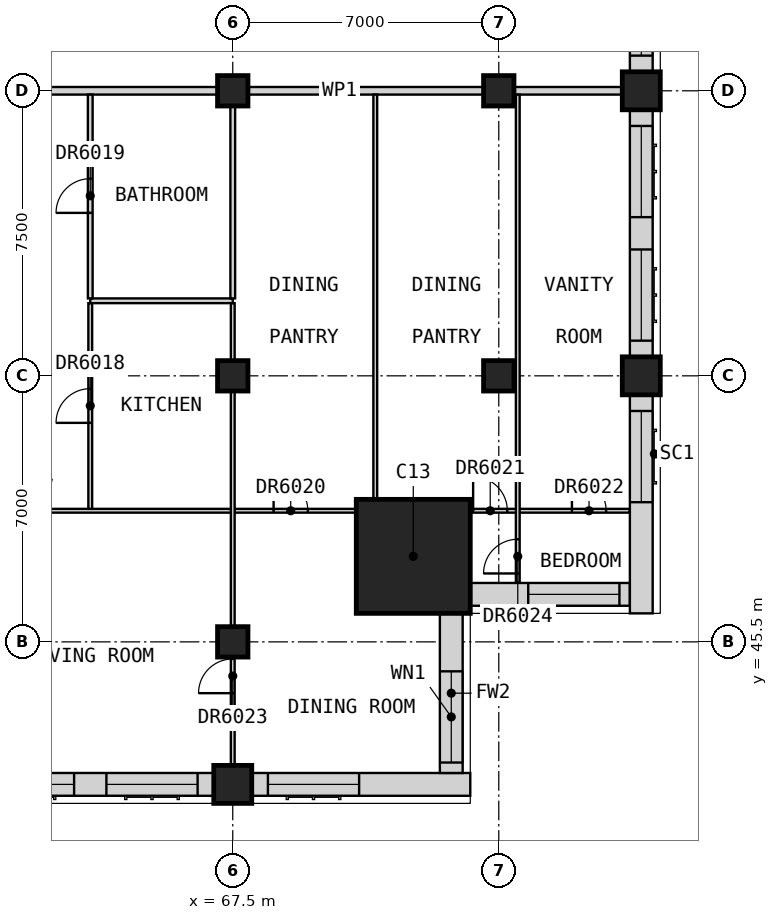
"""IFC4 building model, lengths in metres.
Left out: names, types, materials, properties, quantities, classifications, styles, units other than length and angle.
Written with IfcOpenShell. Run it as: python <this file> out.ifc"""

import sys

from ifc_helpers import new_model, si_unit, direction, frame, frame_2d, origin, origin_2d, place, context, subcontext, project, spatial, rectangle, extrude, element, fill, save


model = new_model("IFC4")
c1 = context("Model", 3, precision=1e-05, world=origin(), true_north=direction((0.0, 1.0)))
c2 = subcontext(c1, "Body", "Model", "MODEL_VIEW")
j1 = project(units=[si_unit("LENGTHUNIT", "METRE"), si_unit("PLANEANGLEUNIT", "RADIAN")], contexts=[c1])
p1 = place(None, origin())
s1 = spatial("IfcSite", under=j1, at=p1, CompositionType="ELEMENT")
p2 = place(p1, origin())
s2 = spatial("IfcBuilding", under=s1, at=p2, CompositionType="ELEMENT")
p3 = place(p2, frame((0.0, 0.0, 226.7)))
s3 = spatial("IfcBuildingStorey", under=s2, at=p3, CompositionType="ELEMENT", Elevation=226.7)
for number, where, z_axis, x_axis in (
    (1, (67.5, 41.75, 0.0), (0.0, 0.0, 1.0), (1.0, 0.0, 0.0)),
    (2, (78.25, 52.5, 0.0), (0.0, 0.0, 1.0), (1.0, 0.0, 0.0)),
    (3, (78.25, 60.0, 0.0), (0.0, 0.0, 1.0), (1.0, 0.0, 0.0)),
):
    element("IfcColumn", number, at=place(p3, frame(where, z_axis=z_axis, x_axis=x_axis)), inside=s3, PredefinedType="COLUMN", context=c2, shape_type="SweptSolid", body=[
        extrude(rectangle(XDim=1.0, YDim=1.0, at=origin_2d()), origin(), (0.0, 0.0, 1.0), 3.5),
    ])
for number, where, z_axis, x_axis in (
    (4, (67.5, 45.5, 0.0), (0.0, 0.0, 1.0), (1.0, 0.0, 0.0)),
    (5, (67.5, 52.5, 0.0), (0.0, 0.0, 1.0), (1.0, 0.0, 0.0)),
    (6, (67.5, 60.0, 0.0), (0.0, 0.0, 1.0), (1.0, 0.0, 0.0)),
    (7, (74.5, 52.5, 0.0), (0.0, 0.0, 1.0), (1.0, 0.0, 0.0)),
    (8, (74.5, 60.0, 0.0), (0.0, 0.0, 1.0), (1.0, 0.0, 0.0)),
):
    element("IfcColumn", number, at=place(p3, frame(where, z_axis=z_axis, x_axis=x_axis)), inside=s3, PredefinedType="COLUMN", context=c2, shape_type="SweptSolid", body=[
        extrude(rectangle(XDim=0.8, YDim=0.8, at=origin_2d()), origin(), (0.0, 0.0, 1.0), 3.5),
    ])
p4 = place(p3, frame((72.25, 47.75, 0.0), z_axis=(0.0, 0.0, 1.0), x_axis=(1.0, 0.0, 0.0)))
e9 = element("IfcColumn", 9, at=p4, inside=s3, PredefinedType="COLUMN", context=c2, shape_type="SweptSolid", body=[
    extrude(rectangle(XDim=3.0, YDim=3.0, at=origin_2d()), origin(), (0.0, 0.0, 1.0), 3.5),
])
p5 = place(p3, frame((60.5, 41.75, 0.0), z_axis=(0.0, 0.0, 1.0), x_axis=(1.0, 0.0, 0.0)))
e10 = element("IfcWall", 10, at=p5, inside=s3, PredefinedType="SOLIDWALL", context=c2, shape_type="SweptSolid", body=[
    extrude(rectangle(XDim=6.5, YDim=0.6, at=frame_2d((3.25, 0.0))), origin(), (0.0, 0.0, 1.0), 2.75),
])
p6 = place(p5, frame((0.425, 0.0, 0.8)))
e11 = element("IfcOpeningElement", 11, at=p6, cuts=e10, PredefinedType="OPENING", context=c2, shape_type="SweptSolid", body=[
    extrude(rectangle(XDim=2.4, YDim=1.8, at=frame_2d((1.2, 0.9))), frame((0.0, 0.31, 0.0), z_axis=(0.0, -1.0, 0.0), x_axis=(1.0, 0.0, 0.0)), (0.0, 0.0, 1.0), 0.62),
])
p7 = place(p5, frame((3.675, 0.0, 0.8)))
e12 = element("IfcOpeningElement", 12, at=p7, cuts=e10, PredefinedType="OPENING", context=c2, shape_type="SweptSolid", body=[
    extrude(rectangle(XDim=2.4, YDim=1.8, at=frame_2d((1.2, 0.9))), frame((0.0, 0.31, 0.0), z_axis=(0.0, -1.0, 0.0), x_axis=(1.0, 0.0, 0.0)), (0.0, 0.0, 1.0), 0.62),
])
p8 = place(p3, frame((68.0, 41.75, 0.0), z_axis=(0.0, 0.0, 1.0), x_axis=(1.0, 0.0, 0.0)))
e13 = element("IfcWall", 13, at=p8, inside=s3, PredefinedType="SOLIDWALL", context=c2, shape_type="SweptSolid", body=[
    extrude(rectangle(XDim=5.75, YDim=0.6, at=frame_2d((2.875, 0.0))), origin(), (0.0, 0.0, 1.0), 2.75),
])
p9 = place(p8, frame((0.425, 0.0, 0.8)))
e14 = element("IfcOpeningElement", 14, at=p9, cuts=e13, PredefinedType="OPENING", context=c2, shape_type="SweptSolid", body=[
    extrude(rectangle(XDim=2.4, YDim=1.8, at=frame_2d((1.2, 0.9))), frame((0.0, 0.31, 0.0), z_axis=(0.0, -1.0, 0.0), x_axis=(1.0, 0.0, 0.0)), (0.0, 0.0, 1.0), 0.62),
])
p10 = place(p3, frame((73.25, 42.05, 0.0), z_axis=(0.0, 0.0, 1.0), x_axis=(0.0, 1.0, 0.0)))
e15 = element("IfcWall", 15, at=p10, inside=s3, PredefinedType="SOLIDWALL", context=c2, shape_type="SweptSolid", body=[
    extrude(rectangle(XDim=4.2, YDim=0.6, at=frame_2d((2.1, 0.0))), origin(), (0.0, 0.0, 1.0), 3.25),
])
p11 = place(p10, frame((0.275, 0.0, 0.8)))
e16 = element("IfcOpeningElement", 16, at=p11, cuts=e15, PredefinedType="OPENING", context=c2, shape_type="SweptSolid", body=[
    extrude(rectangle(XDim=2.4, YDim=1.8, at=frame_2d((1.2, 0.9))), frame((0.0, 0.31, 0.0), z_axis=(0.0, -1.0, 0.0), x_axis=(1.0, 0.0, 0.0)), (0.0, 0.0, 1.0), 0.62),
])
p12 = place(p3, frame((73.75, 46.75, 0.0), z_axis=(0.0, 0.0, 1.0), x_axis=(1.0, 0.0, 0.0)))
e17 = element("IfcWall", 17, at=p12, inside=s3, PredefinedType="SOLIDWALL", context=c2, shape_type="SweptSolid", body=[
    extrude(rectangle(XDim=4.2, YDim=0.6, at=frame_2d((2.1, 0.0))), origin(), (0.0, 0.0, 1.0), 3.25),
])
p13 = place(p12, frame((1.525, 0.0, 0.8)))
e18 = element("IfcOpeningElement", 18, at=p13, cuts=e17, PredefinedType="OPENING", context=c2, shape_type="SweptSolid", body=[
    extrude(rectangle(XDim=2.4, YDim=1.8, at=frame_2d((1.2, 0.9))), frame((0.0, 0.31, 0.0), z_axis=(0.0, -1.0, 0.0), x_axis=(1.0, 0.0, 0.0)), (0.0, 0.0, 1.0), 0.62),
])
p14 = place(p3, frame((78.25, 46.25, 0.0), z_axis=(0.0, 0.0, 1.0), x_axis=(0.0, 1.0, 0.0)))
e19 = element("IfcWall", 19, at=p14, inside=s3, PredefinedType="SOLIDWALL", context=c2, shape_type="SweptSolid", body=[
    extrude(rectangle(XDim=5.75, YDim=0.6, at=frame_2d((2.875, 0.0))), origin(), (0.0, 0.0, 1.0), 2.75),
])
p15 = place(p14, frame((2.925, 0.0, 0.8)))
e20 = element("IfcOpeningElement", 20, at=p15, cuts=e19, PredefinedType="OPENING", context=c2, shape_type="SweptSolid", body=[
    extrude(rectangle(XDim=2.4, YDim=1.8, at=frame_2d((1.2, 0.9))), frame((0.0, 0.31, 0.0), z_axis=(0.0, -1.0, 0.0), x_axis=(1.0, 0.0, 0.0)), (0.0, 0.0, 1.0), 0.62),
])
p16 = place(p3, frame((78.25, 53.0, 0.0), z_axis=(0.0, 0.0, 1.0), x_axis=(0.0, 1.0, 0.0)))
e21 = element("IfcWall", 21, at=p16, inside=s3, PredefinedType="SOLIDWALL", context=c2, shape_type="SweptSolid", body=[
    extrude(rectangle(XDim=6.5, YDim=0.6, at=frame_2d((3.25, 0.0))), origin(), (0.0, 0.0, 1.0), 2.75),
])
p17 = place(p16, frame((0.425, 0.0, 0.8)))
e22 = element("IfcOpeningElement", 22, at=p17, cuts=e21, PredefinedType="OPENING", context=c2, shape_type="SweptSolid", body=[
    extrude(rectangle(XDim=2.4, YDim=1.8, at=frame_2d((1.2, 0.9))), frame((0.0, 0.31, 0.0), z_axis=(0.0, -1.0, 0.0), x_axis=(1.0, 0.0, 0.0)), (0.0, 0.0, 1.0), 0.62),
])
p18 = place(p16, frame((3.675, 0.0, 0.8)))
e23 = element("IfcOpeningElement", 23, at=p18, cuts=e21, PredefinedType="OPENING", context=c2, shape_type="SweptSolid", body=[
    extrude(rectangle(XDim=2.4, YDim=1.8, at=frame_2d((1.2, 0.9))), frame((0.0, 0.31, 0.0), z_axis=(0.0, -1.0, 0.0), x_axis=(1.0, 0.0, 0.0)), (0.0, 0.0, 1.0), 0.62),
])
p19 = place(p3, frame((78.25, 60.5, 0.0), z_axis=(0.0, 0.0, 1.0), x_axis=(0.0, 1.0, 0.0)))
e24 = element("IfcWall", 24, at=p19, inside=s3, PredefinedType="SOLIDWALL", context=c2, shape_type="SweptSolid", body=[
    extrude(rectangle(XDim=6.5, YDim=0.6, at=frame_2d((3.25, 0.0))), origin(), (0.0, 0.0, 1.0), 2.75),
])
p20 = place(p19, frame((0.425, 0.0, 0.8)))
e25 = element("IfcOpeningElement", 25, at=p20, cuts=e24, PredefinedType="OPENING", context=c2, shape_type="SweptSolid", body=[
    extrude(rectangle(XDim=2.4, YDim=1.8, at=frame_2d((1.2, 0.9))), frame((0.0, 0.31, 0.0), z_axis=(0.0, -1.0, 0.0), x_axis=(1.0, 0.0, 0.0)), (0.0, 0.0, 1.0), 0.62),
])
p21 = place(p19, frame((3.675, 0.0, 0.8)))
e26 = element("IfcOpeningElement", 26, at=p21, cuts=e24, PredefinedType="OPENING", context=c2, shape_type="SweptSolid", body=[
    extrude(rectangle(XDim=2.4, YDim=1.8, at=frame_2d((1.2, 0.9))), frame((0.0, 0.31, 0.0), z_axis=(0.0, -1.0, 0.0), x_axis=(1.0, 0.0, 0.0)), (0.0, 0.0, 1.0), 0.62),
])
p22 = place(p3, frame((61.875, 60.0, 0.0), z_axis=(0.0, 0.0, 1.0), x_axis=(1.0, 0.0, 0.0)))
e27 = element("IfcWall", 27, at=p22, inside=s3, PredefinedType="PARTITIONING", context=c2, shape_type="SweptSolid", body=[
    extrude(rectangle(XDim=16.875, YDim=0.2, at=frame_2d((8.438, 0.0))), origin(), (0.0, 0.0, 1.0), 3.25),
])
p23 = place(p3, frame((60.1, 48.95, 0.0), z_axis=(0.0, 0.0, 1.0), x_axis=(1.0, 0.0, 0.0)))
e28 = element("IfcWall", 28, at=p23, inside=s3, PredefinedType="PARTITIONING", context=c2, shape_type="SweptSolid", body=[
    extrude(rectangle(XDim=17.84, YDim=0.1, at=frame_2d((8.92, 0.0))), origin(), (0.0, 0.0, 1.0), 3.25),
])
p24 = place(p23, frame((1.325, 0.0, 0.0)))
e29 = element("IfcOpeningElement", 29, at=p24, cuts=e28, PredefinedType="OPENING", context=c2, shape_type="SweptSolid", body=[
    extrude(rectangle(XDim=0.9, YDim=2.1, at=frame_2d((0.45, 1.05))), frame((0.0, 0.06, 0.0), z_axis=(0.0, -1.0, 0.0), x_axis=(1.0, 0.0, 0.0)), (0.0, 0.0, 1.0), 0.12),
])
p25 = place(p23, frame((8.475, 0.0, 0.0)))
e30 = element("IfcOpeningElement", 30, at=p25, cuts=e28, PredefinedType="OPENING", context=c2, shape_type="SweptSolid", body=[
    extrude(rectangle(XDim=0.9, YDim=2.1, at=frame_2d((0.45, 1.05))), frame((0.0, 0.06, 0.0), z_axis=(0.0, -1.0, 0.0), x_axis=(1.0, 0.0, 0.0)), (0.0, 0.0, 1.0), 0.12),
])
p26 = place(p23, frame((13.725, 0.0, 0.0)))
e31 = element("IfcOpeningElement", 31, at=p26, cuts=e28, PredefinedType="OPENING", context=c2, shape_type="SweptSolid", body=[
    extrude(rectangle(XDim=0.9, YDim=2.1, at=frame_2d((0.45, 1.05))), frame((0.0, 0.06, 0.0), z_axis=(0.0, -1.0, 0.0), x_axis=(1.0, 0.0, 0.0)), (0.0, 0.0, 1.0), 0.12),
])
p27 = place(p23, frame((16.325, 0.0, 0.0)))
e32 = element("IfcOpeningElement", 32, at=p27, cuts=e28, PredefinedType="OPENING", context=c2, shape_type="SweptSolid", body=[
    extrude(rectangle(XDim=0.9, YDim=2.1, at=frame_2d((0.45, 1.05))), frame((0.0, 0.06, 0.0), z_axis=(0.0, -1.0, 0.0), x_axis=(1.0, 0.0, 0.0)), (0.0, 0.0, 1.0), 0.12),
])
p28 = place(p3, frame((63.75, 49.0, 0.0), z_axis=(0.0, 0.0, 1.0), x_axis=(0.0, 1.0, 0.0)))
e33 = element("IfcWall", 33, at=p28, inside=s3, PredefinedType="PARTITIONING", context=c2, shape_type="SweptSolid", body=[
    extrude(rectangle(XDim=5.413, YDim=0.1, at=frame_2d((2.706, 0.0))), origin(), (0.0, 0.0, 1.0), 3.25),
])
p29 = place(p28, frame((2.262, 0.0, 0.0)))
e34 = element("IfcOpeningElement", 34, at=p29, cuts=e33, PredefinedType="OPENING", context=c2, shape_type="SweptSolid", body=[
    extrude(rectangle(XDim=0.9, YDim=2.1, at=frame_2d((0.45, 1.05))), frame((0.0, 0.06, 0.0), z_axis=(0.0, -1.0, 0.0), x_axis=(1.0, 0.0, 0.0)), (0.0, 0.0, 1.0), 0.12),
])
p30 = place(p3, frame((67.5, 41.25, 0.0), z_axis=(0.0, 0.0, 1.0), x_axis=(0.0, 1.0, 0.0)))
e35 = element("IfcWall", 35, at=p30, inside=s3, PredefinedType="PARTITIONING", context=c2, shape_type="SweptSolid", body=[
    extrude(rectangle(XDim=13.163, YDim=0.1, at=frame_2d((6.581, 0.0))), origin(), (0.0, 0.0, 1.0), 3.25),
])
p31 = place(p30, frame((2.9, 0.0, 0.0)))
e36 = element("IfcOpeningElement", 36, at=p31, cuts=e35, PredefinedType="OPENING", context=c2, shape_type="SweptSolid", body=[
    extrude(rectangle(XDim=0.9, YDim=2.1, at=frame_2d((0.45, 1.05))), frame((0.0, 0.06, 0.0), z_axis=(0.0, -1.0, 0.0), x_axis=(1.0, 0.0, 0.0)), (0.0, 0.0, 1.0), 0.12),
])
p32 = place(p3, frame((71.25, 49.0, 0.0), z_axis=(0.0, 0.0, 1.0), x_axis=(0.0, 1.0, 0.0)))
e37 = element("IfcWall", 37, at=p32, inside=s3, PredefinedType="PARTITIONING", context=c2, shape_type="SweptSolid", body=[
    extrude(rectangle(XDim=10.9, YDim=0.1, at=frame_2d((5.45, 0.0))), origin(), (0.0, 0.0, 1.0), 3.25),
])
p33 = place(p3, frame((75.0, 47.06, 0.0), z_axis=(0.0, 0.0, 1.0), x_axis=(0.0, 1.0, 0.0)))
e38 = element("IfcWall", 38, at=p33, inside=s3, PredefinedType="PARTITIONING", context=c2, shape_type="SweptSolid", body=[
    extrude(rectangle(XDim=12.84, YDim=0.1, at=frame_2d((6.42, 0.0))), origin(), (0.0, 0.0, 1.0), 3.25),
])
p34 = place(p33, frame((0.24, 0.0, 0.0)))
e39 = element("IfcOpeningElement", 39, at=p34, cuts=e38, PredefinedType="OPENING", context=c2, shape_type="SweptSolid", body=[
    extrude(rectangle(XDim=0.9, YDim=2.1, at=frame_2d((0.45, 1.05))), frame((0.0, 0.06, 0.0), z_axis=(0.0, -1.0, 0.0), x_axis=(1.0, 0.0, 0.0)), (0.0, 0.0, 1.0), 0.12),
])
p35 = place(p3, frame((63.75, 54.475, 0.0), z_axis=(0.0, 0.0, 1.0), x_axis=(1.0, 0.0, 0.0)))
e40 = element("IfcWall", 40, at=p35, inside=s3, PredefinedType="PARTITIONING", context=c2, shape_type="SweptSolid", body=[
    extrude(rectangle(XDim=3.75, YDim=0.125, at=frame_2d((1.875, 0.0))), origin(), (0.0, 0.0, 1.0), 3.25),
])
p36 = place(p3, frame((63.75, 54.538, 0.0), z_axis=(0.0, 0.0, 1.0), x_axis=(0.0, 1.0, 0.0)))
e41 = element("IfcWall", 41, at=p36, inside=s3, PredefinedType="PARTITIONING", context=c2, shape_type="SweptSolid", body=[
    extrude(rectangle(XDim=5.362, YDim=0.125, at=frame_2d((2.681, 0.0))), origin(), (0.0, 0.0, 1.0), 3.25),
])
p37 = place(p36, frame((2.25, 0.0, 0.0)))
e42 = element("IfcOpeningElement", 42, at=p37, cuts=e41, PredefinedType="OPENING", context=c2, shape_type="SweptSolid", body=[
    extrude(rectangle(XDim=0.9, YDim=2.1, at=frame_2d((0.45, 1.05))), frame((0.0, 0.073, 0.0), z_axis=(0.0, -1.0, 0.0), x_axis=(1.0, 0.0, 0.0)), (0.0, 0.0, 1.0), 0.145),
])
p38 = place(p3, frame((67.5, 54.538, 0.0), z_axis=(0.0, 0.0, 1.0), x_axis=(0.0, 1.0, 0.0)))
e43 = element("IfcWall", 43, at=p38, inside=s3, PredefinedType="PARTITIONING", context=c2, shape_type="SweptSolid", body=[
    extrude(rectangle(XDim=5.362, YDim=0.125, at=frame_2d((2.681, 0.0))), origin(), (0.0, 0.0, 1.0), 3.25),
])
p39 = place(p6, origin())
e44 = element("IfcWindow", 44, at=p39, inside=s3, PartitioningType="SINGLE_PANEL", PredefinedType="WINDOW", context=c2, shape_type="SweptSolid", body=[
    extrude(rectangle(XDim=2.4, YDim=1.8, at=frame_2d((1.2, 0.9))), frame((0.0, -0.07, 0.0), z_axis=(0.0, -1.0, 0.0), x_axis=(1.0, 0.0, 0.0)), (0.0, 0.0, 1.0), 0.06),
])
fill(e11, e44)
p40 = place(p7, origin())
e45 = element("IfcWindow", 45, at=p40, inside=s3, PartitioningType="SINGLE_PANEL", PredefinedType="WINDOW", context=c2, shape_type="SweptSolid", body=[
    extrude(rectangle(XDim=2.4, YDim=1.8, at=frame_2d((1.2, 0.9))), frame((0.0, -0.07, 0.0), z_axis=(0.0, -1.0, 0.0), x_axis=(1.0, 0.0, 0.0)), (0.0, 0.0, 1.0), 0.06),
])
fill(e12, e45)
p41 = place(p9, origin())
e46 = element("IfcWindow", 46, at=p41, inside=s3, PartitioningType="SINGLE_PANEL", PredefinedType="WINDOW", context=c2, shape_type="SweptSolid", body=[
    extrude(rectangle(XDim=2.4, YDim=1.8, at=frame_2d((1.2, 0.9))), frame((0.0, -0.07, 0.0), z_axis=(0.0, -1.0, 0.0), x_axis=(1.0, 0.0, 0.0)), (0.0, 0.0, 1.0), 0.06),
])
fill(e14, e46)
p42 = place(p11, origin())
e47 = element("IfcWindow", 47, at=p42, inside=s3, PartitioningType="SINGLE_PANEL", PredefinedType="WINDOW", context=c2, shape_type="SweptSolid", body=[
    extrude(rectangle(XDim=2.4, YDim=1.8, at=frame_2d((1.2, 0.9))), frame((0.0, -0.07, 0.0), z_axis=(0.0, -1.0, 0.0), x_axis=(1.0, 0.0, 0.0)), (0.0, 0.0, 1.0), 0.06),
])
fill(e16, e47)
p43 = place(p13, origin())
e48 = element("IfcWindow", 48, at=p43, inside=s3, PartitioningType="SINGLE_PANEL", PredefinedType="WINDOW", context=c2, shape_type="SweptSolid", body=[
    extrude(rectangle(XDim=2.4, YDim=1.8, at=frame_2d((1.2, 0.9))), frame((0.0, -0.07, 0.0), z_axis=(0.0, -1.0, 0.0), x_axis=(1.0, 0.0, 0.0)), (0.0, 0.0, 1.0), 0.06),
])
fill(e18, e48)
p44 = place(p15, origin())
e49 = element("IfcWindow", 49, at=p44, inside=s3, PartitioningType="SINGLE_PANEL", PredefinedType="WINDOW", context=c2, shape_type="SweptSolid", body=[
    extrude(rectangle(XDim=2.4, YDim=1.8, at=frame_2d((1.2, 0.9))), frame((0.0, -0.07, 0.0), z_axis=(0.0, -1.0, 0.0), x_axis=(1.0, 0.0, 0.0)), (0.0, 0.0, 1.0), 0.06),
])
fill(e20, e49)
p45 = place(p17, origin())
e50 = element("IfcWindow", 50, at=p45, inside=s3, PartitioningType="SINGLE_PANEL", PredefinedType="WINDOW", context=c2, shape_type="SweptSolid", body=[
    extrude(rectangle(XDim=2.4, YDim=1.8, at=frame_2d((1.2, 0.9))), frame((0.0, -0.07, 0.0), z_axis=(0.0, -1.0, 0.0), x_axis=(1.0, 0.0, 0.0)), (0.0, 0.0, 1.0), 0.06),
])
fill(e22, e50)
p46 = place(p18, origin())
e51 = element("IfcWindow", 51, at=p46, inside=s3, PartitioningType="SINGLE_PANEL", PredefinedType="WINDOW", context=c2, shape_type="SweptSolid", body=[
    extrude(rectangle(XDim=2.4, YDim=1.8, at=frame_2d((1.2, 0.9))), frame((0.0, -0.07, 0.0), z_axis=(0.0, -1.0, 0.0), x_axis=(1.0, 0.0, 0.0)), (0.0, 0.0, 1.0), 0.06),
])
fill(e23, e51)
p47 = place(p20, origin())
e52 = element("IfcWindow", 52, at=p47, inside=s3, PartitioningType="SINGLE_PANEL", PredefinedType="WINDOW", context=c2, shape_type="SweptSolid", body=[
    extrude(rectangle(XDim=2.4, YDim=1.8, at=frame_2d((1.2, 0.9))), frame((0.0, -0.07, 0.0), z_axis=(0.0, -1.0, 0.0), x_axis=(1.0, 0.0, 0.0)), (0.0, 0.0, 1.0), 0.06),
])
fill(e25, e52)
p48 = place(p29, origin())
e53 = element("IfcDoor", 53, at=p48, inside=s3, OperationType="SINGLE_SWING_RIGHT", PredefinedType="DOOR", context=c2, shape_type="SweptSolid", body=[
    extrude(rectangle(XDim=0.9, YDim=2.1, at=frame_2d((0.45, 1.05))), frame((0.0, 0.025, 0.0), z_axis=(0.0, -1.0, 0.0), x_axis=(1.0, 0.0, 0.0)), (0.0, 0.0, 1.0), 0.05),
])
fill(e34, e53)
p49 = place(p37, origin())
e54 = element("IfcDoor", 54, at=p49, inside=s3, OperationType="SINGLE_SWING_RIGHT", PredefinedType="DOOR", context=c2, shape_type="SweptSolid", body=[
    extrude(rectangle(XDim=0.9, YDim=2.1, at=frame_2d((0.45, 1.05))), frame((0.0, 0.025, 0.0), z_axis=(0.0, -1.0, 0.0), x_axis=(1.0, 0.0, 0.0)), (0.0, 0.0, 1.0), 0.05),
])
fill(e42, e54)
p50 = place(p25, origin())
e55 = element("IfcDoor", 55, at=p50, inside=s3, OperationType="SINGLE_SWING_LEFT", PredefinedType="DOOR", context=c2, shape_type="SweptSolid", body=[
    extrude(rectangle(XDim=0.9, YDim=2.1, at=frame_2d((0.45, 1.05))), frame((0.0, 0.025, 0.0), z_axis=(0.0, -1.0, 0.0), x_axis=(1.0, 0.0, 0.0)), (0.0, 0.0, 1.0), 0.05),
])
fill(e30, e55)
p51 = place(p26, origin())
e56 = element("IfcDoor", 56, at=p51, inside=s3, OperationType="SINGLE_SWING_RIGHT", PredefinedType="DOOR", context=c2, shape_type="SweptSolid", body=[
    extrude(rectangle(XDim=0.9, YDim=2.1, at=frame_2d((0.45, 1.05))), frame((0.0, 0.025, 0.0), z_axis=(0.0, -1.0, 0.0), x_axis=(1.0, 0.0, 0.0)), (0.0, 0.0, 1.0), 0.05),
])
fill(e31, e56)
p52 = place(p27, origin())
e57 = element("IfcDoor", 57, at=p52, inside=s3, OperationType="SINGLE_SWING_LEFT", PredefinedType="DOOR", context=c2, shape_type="SweptSolid", body=[
    extrude(rectangle(XDim=0.9, YDim=2.1, at=frame_2d((0.45, 1.05))), frame((0.0, 0.025, 0.0), z_axis=(0.0, -1.0, 0.0), x_axis=(1.0, 0.0, 0.0)), (0.0, 0.0, 1.0), 0.05),
])
fill(e32, e57)
p53 = place(p31, origin())
e58 = element("IfcDoor", 58, at=p53, inside=s3, OperationType="SINGLE_SWING_LEFT", PredefinedType="DOOR", context=c2, shape_type="SweptSolid", body=[
    extrude(rectangle(XDim=0.9, YDim=2.1, at=frame_2d((0.45, 1.05))), frame((0.0, 0.025, 0.0), z_axis=(0.0, -1.0, 0.0), x_axis=(1.0, 0.0, 0.0)), (0.0, 0.0, 1.0), 0.05),
])
fill(e36, e58)
p54 = place(p34, origin())
e59 = element("IfcDoor", 59, at=p54, inside=s3, OperationType="SINGLE_SWING_RIGHT", PredefinedType="DOOR", context=c2, shape_type="SweptSolid", body=[
    extrude(rectangle(XDim=0.9, YDim=2.1, at=frame_2d((0.45, 1.05))), frame((0.0, 0.025, 0.0), z_axis=(0.0, -1.0, 0.0), x_axis=(1.0, 0.0, 0.0)), (0.0, 0.0, 1.0), 0.05),
])
fill(e39, e59)
save(model, sys.argv[1])
